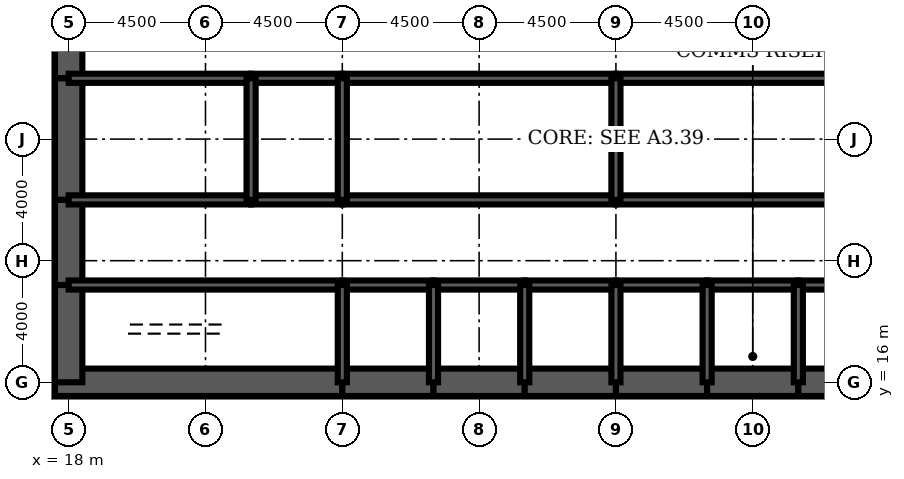
"""IFC4 building model, lengths in metres.
Left out: names, types, materials, properties, quantities, classifications, styles, units other than length and angle.
Written with IfcOpenShell. Run it as: python <this file> out.ifc"""

import sys

from ifc_helpers import new_model, si_unit, direction, frame, frame_2d, origin, place, context, subcontext, project, spatial, rectangle, extrude, element, fill, save


model = new_model("IFC4")
c1 = context("Model", 3, precision=1e-05, world=origin(), true_north=direction((0.0, 1.0)))
c2 = subcontext(c1, "Body", "Model", "MODEL_VIEW")
j1 = project(units=[si_unit("LENGTHUNIT", "METRE"), si_unit("PLANEANGLEUNIT", "RADIAN")], contexts=[c1])
p1 = place(None, origin())
s1 = spatial("IfcSite", under=j1, at=p1, CompositionType="ELEMENT")
p2 = place(p1, origin())
s2 = spatial("IfcBuilding", under=s1, at=p2, CompositionType="ELEMENT")
p3 = place(p2, frame((0.0, 0.0, 167.7)))
s3 = spatial("IfcBuildingStorey", under=s2, at=p3, CompositionType="ELEMENT", Elevation=167.7)
p4 = place(p3, frame((17.55, 16.0, 0.0), z_axis=(0.0, 0.0, 1.0), x_axis=(1.0, 0.0, 0.0)))
e1 = element("IfcWall", 1, at=p4, inside=s3, PredefinedType="SHEAR", context=c2, shape_type="SweptSolid", body=[
    extrude(rectangle(XDim=9.45, YDim=0.9, at=frame_2d((4.725, 0.0))), origin(), (0.0, 0.0, 1.0), 4.2),
])
for number, where, z_axis, x_axis in (
    (2, (27.0, 16.0, 0.0), (0.0, 0.0, 1.0), (1.0, 0.0, 0.0)),
    (3, (30.0, 16.0, 0.0), (0.0, 0.0, 1.0), (1.0, 0.0, 0.0)),
    (4, (33.0, 16.0, 0.0), (0.0, 0.0, 1.0), (1.0, 0.0, 0.0)),
    (5, (36.0, 16.0, 0.0), (0.0, 0.0, 1.0), (1.0, 0.0, 0.0)),
    (6, (39.0, 16.0, 0.0), (0.0, 0.0, 1.0), (1.0, 0.0, 0.0)),
    (7, (42.0, 16.0, 0.0), (0.0, 0.0, 1.0), (1.0, 0.0, 0.0)),
):
    element("IfcWall", number, at=place(p3, frame(where, z_axis=z_axis, x_axis=x_axis)), inside=s3, PredefinedType="SHEAR", context=c2, shape_type="SweptSolid", body=[
        extrude(rectangle(XDim=3.0, YDim=0.9, at=frame_2d((1.5, 0.0))), origin(), (0.0, 0.0, 1.0), 4.2),
    ])
p5 = place(p3, frame((18.0, 28.8, 0.0), z_axis=(0.0, 0.0, 1.0), x_axis=(0.0, -1.0, 0.0)))
e8 = element("IfcWall", 8, at=p5, inside=s3, PredefinedType="SHEAR", context=c2, shape_type="SweptSolid", body=[
    extrude(rectangle(XDim=2.8, YDim=0.9, at=frame_2d((1.4, 0.0))), origin(), (0.0, 0.0, 1.0), 4.2),
])
p6 = place(p5, frame((0.4, 0.0, 0.0)))
e9 = element("IfcOpeningElement", 9, at=p6, cuts=e8, PredefinedType="OPENING", context=c2, shape_type="SweptSolid", body=[
    extrude(rectangle(XDim=1.8, YDim=2.1, at=frame_2d((0.9, 1.05))), frame((0.0, 0.46, 0.0), z_axis=(0.0, -1.0, 0.0), x_axis=(1.0, 0.0, 0.0)), (0.0, 0.0, 1.0), 0.92),
])
p7 = place(p3, frame((18.0, 26.0, 0.0), z_axis=(0.0, 0.0, 1.0), x_axis=(0.0, -1.0, 0.0)))
e10 = element("IfcWall", 10, at=p7, inside=s3, PredefinedType="SHEAR", context=c2, shape_type="SweptSolid", body=[
    extrude(rectangle(XDim=4.0, YDim=0.9, at=frame_2d((2.0, 0.0))), origin(), (0.0, 0.0, 1.0), 4.2),
])
p8 = place(p3, frame((18.0, 22.0, 0.0), z_axis=(0.0, 0.0, 1.0), x_axis=(0.0, -1.0, 0.0)))
e11 = element("IfcWall", 11, at=p8, inside=s3, PredefinedType="SHEAR", context=c2, shape_type="SweptSolid", body=[
    extrude(rectangle(XDim=2.8, YDim=0.9, at=frame_2d((1.4, 0.0))), origin(), (0.0, 0.0, 1.0), 4.2),
])
p9 = place(p8, frame((0.6, 0.0, 0.0)))
e12 = element("IfcOpeningElement", 12, at=p9, cuts=e11, PredefinedType="OPENING", context=c2, shape_type="SweptSolid", body=[
    extrude(rectangle(XDim=1.8, YDim=2.1, at=frame_2d((0.9, 1.05))), frame((0.0, 0.46, 0.0), z_axis=(0.0, -1.0, 0.0), x_axis=(1.0, 0.0, 0.0)), (0.0, 0.0, 1.0), 0.92),
])
p10 = place(p3, frame((18.0, 19.2, 0.0), z_axis=(0.0, 0.0, 1.0), x_axis=(0.0, -1.0, 0.0)))
e13 = element("IfcWall", 13, at=p10, inside=s3, PredefinedType="SHEAR", context=c2, shape_type="SweptSolid", body=[
    extrude(rectangle(XDim=3.2, YDim=0.9, at=frame_2d((1.6, 0.0))), origin(), (0.0, 0.0, 1.0), 4.2),
])
p11 = place(p3, frame((18.0, 19.2, 0.0), z_axis=(0.0, 0.0, 1.0), x_axis=(1.0, 0.0, 0.0)))
e14 = element("IfcWall", 14, at=p11, inside=s3, PredefinedType="SOLIDWALL", context=c2, shape_type="SweptSolid", body=[
    extrude(rectangle(XDim=9.0, YDim=0.3, at=frame_2d((4.5, 0.0))), origin(), (0.0, 0.0, 1.0), 4.2),
])
p12 = place(p11, frame((0.65, 0.0, 0.0)))
e15 = element("IfcOpeningElement", 15, at=p12, cuts=e14, PredefinedType="OPENING", context=c2, shape_type="SweptSolid", body=[
    extrude(rectangle(XDim=1.0, YDim=2.1, at=frame_2d((0.5, 1.05))), frame((0.0, 0.16, 0.0), z_axis=(0.0, -1.0, 0.0), x_axis=(1.0, 0.0, 0.0)), (0.0, 0.0, 1.0), 0.32),
])
p13 = place(p3, frame((27.0, 19.2, 0.0), z_axis=(0.0, 0.0, 1.0), x_axis=(1.0, 0.0, 0.0)))
e16 = element("IfcWall", 16, at=p13, inside=s3, PredefinedType="SOLIDWALL", context=c2, shape_type="SweptSolid", body=[
    extrude(rectangle(XDim=3.0, YDim=0.3, at=frame_2d((1.5, 0.0))), origin(), (0.0, 0.0, 1.0), 4.2),
])
p14 = place(p13, frame((0.95, 0.0, 0.0)))
e17 = element("IfcOpeningElement", 17, at=p14, cuts=e16, PredefinedType="OPENING", context=c2, shape_type="SweptSolid", body=[
    extrude(rectangle(XDim=1.1, YDim=2.2, at=frame_2d((0.55, 1.1))), frame((0.0, 0.16, 0.0), z_axis=(0.0, -1.0, 0.0), x_axis=(1.0, 0.0, 0.0)), (0.0, 0.0, 1.0), 0.32),
])
p15 = place(p3, frame((30.0, 19.2, 0.0), z_axis=(0.0, 0.0, 1.0), x_axis=(1.0, 0.0, 0.0)))
e18 = element("IfcWall", 18, at=p15, inside=s3, PredefinedType="SOLIDWALL", context=c2, shape_type="SweptSolid", body=[
    extrude(rectangle(XDim=3.0, YDim=0.3, at=frame_2d((1.5, 0.0))), origin(), (0.0, 0.0, 1.0), 4.2),
])
p16 = place(p15, frame((0.95, 0.0, 0.0)))
e19 = element("IfcOpeningElement", 19, at=p16, cuts=e18, PredefinedType="OPENING", context=c2, shape_type="SweptSolid", body=[
    extrude(rectangle(XDim=1.1, YDim=2.2, at=frame_2d((0.55, 1.1))), frame((0.0, 0.16, 0.0), z_axis=(0.0, -1.0, 0.0), x_axis=(1.0, 0.0, 0.0)), (0.0, 0.0, 1.0), 0.32),
])
p17 = place(p3, frame((33.0, 19.2, 0.0), z_axis=(0.0, 0.0, 1.0), x_axis=(1.0, 0.0, 0.0)))
e20 = element("IfcWall", 20, at=p17, inside=s3, PredefinedType="SOLIDWALL", context=c2, shape_type="SweptSolid", body=[
    extrude(rectangle(XDim=3.0, YDim=0.3, at=frame_2d((1.5, 0.0))), origin(), (0.0, 0.0, 1.0), 4.2),
])
p18 = place(p17, frame((0.95, 0.0, 0.0)))
e21 = element("IfcOpeningElement", 21, at=p18, cuts=e20, PredefinedType="OPENING", context=c2, shape_type="SweptSolid", body=[
    extrude(rectangle(XDim=1.1, YDim=2.2, at=frame_2d((0.55, 1.1))), frame((0.0, 0.16, 0.0), z_axis=(0.0, -1.0, 0.0), x_axis=(1.0, 0.0, 0.0)), (0.0, 0.0, 1.0), 0.32),
])
p19 = place(p3, frame((36.0, 19.2, 0.0), z_axis=(0.0, 0.0, 1.0), x_axis=(1.0, 0.0, 0.0)))
e22 = element("IfcWall", 22, at=p19, inside=s3, PredefinedType="SOLIDWALL", context=c2, shape_type="SweptSolid", body=[
    extrude(rectangle(XDim=3.0, YDim=0.3, at=frame_2d((1.5, 0.0))), origin(), (0.0, 0.0, 1.0), 4.2),
])
p20 = place(p19, frame((0.95, 0.0, 0.0)))
e23 = element("IfcOpeningElement", 23, at=p20, cuts=e22, PredefinedType="OPENING", context=c2, shape_type="SweptSolid", body=[
    extrude(rectangle(XDim=1.1, YDim=2.2, at=frame_2d((0.55, 1.1))), frame((0.0, 0.16, 0.0), z_axis=(0.0, -1.0, 0.0), x_axis=(1.0, 0.0, 0.0)), (0.0, 0.0, 1.0), 0.32),
])
p21 = place(p3, frame((39.0, 19.2, 0.0), z_axis=(0.0, 0.0, 1.0), x_axis=(1.0, 0.0, 0.0)))
e24 = element("IfcWall", 24, at=p21, inside=s3, PredefinedType="SOLIDWALL", context=c2, shape_type="SweptSolid", body=[
    extrude(rectangle(XDim=3.0, YDim=0.3, at=frame_2d((1.5, 0.0))), origin(), (0.0, 0.0, 1.0), 4.2),
])
p22 = place(p21, frame((1.0, 0.0, 0.0)))
e25 = element("IfcOpeningElement", 25, at=p22, cuts=e24, PredefinedType="OPENING", context=c2, shape_type="SweptSolid", body=[
    extrude(rectangle(XDim=1.0, YDim=2.1, at=frame_2d((0.5, 1.05))), frame((0.0, 0.16, 0.0), z_axis=(0.0, -1.0, 0.0), x_axis=(1.0, 0.0, 0.0)), (0.0, 0.0, 1.0), 0.32),
])
p23 = place(p3, frame((42.0, 19.2, 0.0), z_axis=(0.0, 0.0, 1.0), x_axis=(1.0, 0.0, 0.0)))
e26 = element("IfcWall", 26, at=p23, inside=s3, PredefinedType="SOLIDWALL", context=c2, shape_type="SweptSolid", body=[
    extrude(rectangle(XDim=3.0, YDim=0.3, at=frame_2d((1.5, 0.0))), origin(), (0.0, 0.0, 1.0), 4.2),
])
p24 = place(p3, frame((18.0, 22.0, 0.0), z_axis=(0.0, 0.0, 1.0), x_axis=(1.0, 0.0, 0.0)))
e27 = element("IfcWall", 27, at=p24, inside=s3, PredefinedType="SOLIDWALL", context=c2, shape_type="SweptSolid", body=[
    extrude(rectangle(XDim=6.0, YDim=0.3, at=frame_2d((3.0, 0.0))), origin(), (0.0, 0.0, 1.0), 4.2),
])
p25 = place(p24, frame((4.4, 0.0, 0.0)))
e28 = element("IfcOpeningElement", 28, at=p25, cuts=e27, PredefinedType="OPENING", context=c2, shape_type="SweptSolid", body=[
    extrude(rectangle(XDim=1.0, YDim=2.1, at=frame_2d((0.5, 1.05))), frame((0.0, 0.16, 0.0), z_axis=(0.0, -1.0, 0.0), x_axis=(1.0, 0.0, 0.0)), (0.0, 0.0, 1.0), 0.32),
])
p26 = place(p24, frame((1.0, 0.0, 0.0)))
e29 = element("IfcOpeningElement", 29, at=p26, cuts=e27, PredefinedType="OPENING", context=c2, shape_type="SweptSolid", body=[
    extrude(rectangle(XDim=1.0, YDim=2.1, at=frame_2d((0.5, 1.05))), frame((0.0, 0.16, 0.0), z_axis=(0.0, -1.0, 0.0), x_axis=(1.0, 0.0, 0.0)), (0.0, 0.0, 1.0), 0.32),
])
p27 = place(p3, frame((24.0, 22.0, 0.0), z_axis=(0.0, 0.0, 1.0), x_axis=(1.0, 0.0, 0.0)))
e30 = element("IfcWall", 30, at=p27, inside=s3, PredefinedType="SOLIDWALL", context=c2, shape_type="SweptSolid", body=[
    extrude(rectangle(XDim=3.0, YDim=0.3, at=frame_2d((1.5, 0.0))), origin(), (0.0, 0.0, 1.0), 4.2),
])
p28 = place(p27, frame((1.0, 0.0, 0.0)))
e31 = element("IfcOpeningElement", 31, at=p28, cuts=e30, PredefinedType="OPENING", context=c2, shape_type="SweptSolid", body=[
    extrude(rectangle(XDim=1.0, YDim=2.1, at=frame_2d((0.5, 1.05))), frame((0.0, 0.16, 0.0), z_axis=(0.0, -1.0, 0.0), x_axis=(1.0, 0.0, 0.0)), (0.0, 0.0, 1.0), 0.32),
])
p29 = place(p3, frame((27.0, 22.0, 0.0), z_axis=(0.0, 0.0, 1.0), x_axis=(1.0, 0.0, 0.0)))
e32 = element("IfcWall", 32, at=p29, inside=s3, PredefinedType="SOLIDWALL", context=c2, shape_type="SweptSolid", body=[
    extrude(rectangle(XDim=9.0, YDim=0.3, at=frame_2d((4.5, 0.0))), origin(), (0.0, 0.0, 1.0), 4.2),
])
p30 = place(p29, frame((4.0, 0.0, 0.0)))
e33 = element("IfcOpeningElement", 33, at=p30, cuts=e32, PredefinedType="OPENING", context=c2, shape_type="SweptSolid", body=[
    extrude(rectangle(XDim=1.0, YDim=2.1, at=frame_2d((0.5, 1.05))), frame((0.0, 0.16, 0.0), z_axis=(0.0, -1.0, 0.0), x_axis=(1.0, 0.0, 0.0)), (0.0, 0.0, 1.0), 0.32),
])
p31 = place(p3, frame((36.0, 22.0, 0.0), z_axis=(0.0, 0.0, 1.0), x_axis=(1.0, 0.0, 0.0)))
e34 = element("IfcWall", 34, at=p31, inside=s3, PredefinedType="SOLIDWALL", context=c2, shape_type="SweptSolid", body=[
    extrude(rectangle(XDim=9.0, YDim=0.3, at=frame_2d((4.5, 0.0))), origin(), (0.0, 0.0, 1.0), 4.2),
])
p32 = place(p31, frame((4.0, 0.0, 0.0)))
e35 = element("IfcOpeningElement", 35, at=p32, cuts=e34, PredefinedType="OPENING", context=c2, shape_type="SweptSolid", body=[
    extrude(rectangle(XDim=1.0, YDim=2.1, at=frame_2d((0.5, 1.05))), frame((0.0, 0.16, 0.0), z_axis=(0.0, -1.0, 0.0), x_axis=(1.0, 0.0, 0.0)), (0.0, 0.0, 1.0), 0.32),
])
p33 = place(p3, frame((18.0, 26.0, 0.0), z_axis=(0.0, 0.0, 1.0), x_axis=(1.0, 0.0, 0.0)))
e36 = element("IfcWall", 36, at=p33, inside=s3, PredefinedType="SOLIDWALL", context=c2, shape_type="SweptSolid", body=[
    extrude(rectangle(XDim=6.0, YDim=0.3, at=frame_2d((3.0, 0.0))), origin(), (0.0, 0.0, 1.0), 4.2),
])
p34 = place(p3, frame((24.0, 26.0, 0.0), z_axis=(0.0, 0.0, 1.0), x_axis=(1.0, 0.0, 0.0)))
e37 = element("IfcWall", 37, at=p34, inside=s3, PredefinedType="SOLIDWALL", context=c2, shape_type="SweptSolid", body=[
    extrude(rectangle(XDim=3.0, YDim=0.3, at=frame_2d((1.5, 0.0))), origin(), (0.0, 0.0, 1.0), 4.2),
])
for number, where, z_axis, x_axis in (
    (38, (27.0, 26.0, 0.0), (0.0, 0.0, 1.0), (1.0, 0.0, 0.0)),
    (39, (36.0, 26.0, 0.0), (0.0, 0.0, 1.0), (1.0, 0.0, 0.0)),
):
    element("IfcWall", number, at=place(p3, frame(where, z_axis=z_axis, x_axis=x_axis)), inside=s3, PredefinedType="SOLIDWALL", context=c2, shape_type="SweptSolid", body=[
        extrude(rectangle(XDim=9.0, YDim=0.3, at=frame_2d((4.5, 0.0))), origin(), (0.0, 0.0, 1.0), 4.2),
    ])
for number, where, z_axis, x_axis in (
    (40, (27.0, 16.0, 0.0), (0.0, 0.0, 1.0), (0.0, 1.0, 0.0)),
    (41, (30.0, 16.0, 0.0), (0.0, 0.0, 1.0), (0.0, 1.0, 0.0)),
    (42, (33.0, 16.0, 0.0), (0.0, 0.0, 1.0), (0.0, 1.0, 0.0)),
    (43, (36.0, 16.0, 0.0), (0.0, 0.0, 1.0), (0.0, 1.0, 0.0)),
    (44, (39.0, 16.0, 0.0), (0.0, 0.0, 1.0), (0.0, 1.0, 0.0)),
    (45, (42.0, 16.0, 0.0), (0.0, 0.0, 1.0), (0.0, 1.0, 0.0)),
):
    element("IfcWall", number, at=place(p3, frame(where, z_axis=z_axis, x_axis=x_axis)), inside=s3, PredefinedType="SOLIDWALL", context=c2, shape_type="SweptSolid", body=[
        extrude(rectangle(XDim=3.2, YDim=0.3, at=frame_2d((1.6, 0.0))), origin(), (0.0, 0.0, 1.0), 4.2),
    ])
for number, where, z_axis, x_axis in (
    (46, (24.0, 22.0, 0.0), (0.0, 0.0, 1.0), (0.0, 1.0, 0.0)),
    (47, (27.0, 22.0, 0.0), (0.0, 0.0, 1.0), (0.0, 1.0, 0.0)),
    (48, (36.0, 22.0, 0.0), (0.0, 0.0, 1.0), (0.0, 1.0, 0.0)),
):
    element("IfcWall", number, at=place(p3, frame(where, z_axis=z_axis, x_axis=x_axis)), inside=s3, PredefinedType="SOLIDWALL", context=c2, shape_type="SweptSolid", body=[
        extrude(rectangle(XDim=4.0, YDim=0.3, at=frame_2d((2.0, 0.0))), origin(), (0.0, 0.0, 1.0), 4.2),
    ])
p35 = place(p3, frame((39.15, 17.4, 0.0), z_axis=(0.0, 0.0, 1.0), x_axis=(1.0, 0.0, 0.0)))
e49 = element("IfcWall", 49, at=p35, inside=s3, PredefinedType="SOLIDWALL", context=c2, shape_type="SweptSolid", body=[
    extrude(rectangle(XDim=2.7, YDim=0.3, at=frame_2d((1.35, 0.0))), origin(), (0.0, 0.0, 1.0), 4.04),
])
p36 = place(p35, frame((0.85, 0.0, 0.0)))
e50 = element("IfcOpeningElement", 50, at=p36, cuts=e49, PredefinedType="OPENING", context=c2, shape_type="SweptSolid", body=[
    extrude(rectangle(XDim=1.0, YDim=2.1, at=frame_2d((0.5, 1.05))), frame((0.0, 0.16, 0.0), z_axis=(0.0, -1.0, 0.0), x_axis=(1.0, 0.0, 0.0)), (0.0, 0.0, 1.0), 0.32),
])
p37 = place(p3, frame((38.5, 22.15, 0.0), z_axis=(0.0, 0.0, 1.0), x_axis=(0.0, 1.0, 0.0)))
e51 = element("IfcWall", 51, at=p37, inside=s3, PredefinedType="PARTITIONING", context=c2, shape_type="SweptSolid", body=[
    extrude(rectangle(XDim=3.7, YDim=0.15, at=frame_2d((1.85, 0.0))), origin(), (0.0, 0.0, 1.0), 3.0),
])
p38 = place(p37, frame((2.2, 0.0, 0.0)))
e52 = element("IfcOpeningElement", 52, at=p38, cuts=e51, PredefinedType="OPENING", context=c2, shape_type="SweptSolid", body=[
    extrude(rectangle(XDim=1.0, YDim=2.1, at=frame_2d((0.5, 1.05))), frame((0.0, 0.085, 0.0), z_axis=(0.0, -1.0, 0.0), x_axis=(1.0, 0.0, 0.0)), (0.0, 0.0, 1.0), 0.17),
])
p39 = place(p3, frame((20.625, 22.15, 0.0), z_axis=(0.0, 0.0, 1.0), x_axis=(0.0, 1.0, 0.0)))
e53 = element("IfcWall", 53, at=p39, inside=s3, PredefinedType="PARTITIONING", context=c2, shape_type="SweptSolid", body=[
    extrude(rectangle(XDim=3.7, YDim=0.15, at=frame_2d((1.85, 0.0))), origin(), (0.0, 0.0, 1.0), 3.0),
])
p40 = place(p3, frame((24.5, 19.35, 0.0), z_axis=(0.0, 0.0, 1.0), x_axis=(0.0, 1.0, 0.0)))
e54 = element("IfcWall", 54, at=p40, inside=s3, PredefinedType="PARTITIONING", context=c2, shape_type="SweptSolid", body=[
    extrude(rectangle(XDim=2.5, YDim=0.15, at=frame_2d((1.25, 0.0))), origin(), (0.0, 0.0, 1.0), 3.0),
])
p41 = place(p40, frame((1.15, 0.0, 0.0)))
e55 = element("IfcOpeningElement", 55, at=p41, cuts=e54, PredefinedType="OPENING", context=c2, shape_type="SweptSolid", body=[
    extrude(rectangle(XDim=1.0, YDim=2.1, at=frame_2d((0.5, 1.05))), frame((0.0, 0.085, 0.0), z_axis=(0.0, -1.0, 0.0), x_axis=(1.0, 0.0, 0.0)), (0.0, 0.0, 1.0), 0.17),
])
p42 = place(p36, origin())
e56 = element("IfcDoor", 56, at=p42, inside=s3, OperationType="SINGLE_SWING_LEFT", PredefinedType="DOOR", context=c2, shape_type="SweptSolid", body=[
    extrude(rectangle(XDim=1.0, YDim=2.1, at=frame_2d((0.5, 1.05))), frame((0.0, 0.025, 0.0), z_axis=(0.0, -1.0, 0.0), x_axis=(1.0, 0.0, 0.0)), (0.0, 0.0, 1.0), 0.05),
])
fill(e50, e56)
p43 = place(p38, origin())
e57 = element("IfcDoor", 57, at=p43, inside=s3, OperationType="SINGLE_SWING_RIGHT", PredefinedType="DOOR", context=c2, shape_type="SweptSolid", body=[
    extrude(rectangle(XDim=1.0, YDim=2.1, at=frame_2d((0.5, 1.05))), frame((0.0, 0.025, 0.0), z_axis=(0.0, -1.0, 0.0), x_axis=(1.0, 0.0, 0.0)), (0.0, 0.0, 1.0), 0.05),
])
fill(e52, e57)
p44 = place(p41, origin())
e58 = element("IfcDoor", 58, at=p44, inside=s3, OperationType="SINGLE_SWING_RIGHT", PredefinedType="DOOR", context=c2, shape_type="SweptSolid", body=[
    extrude(rectangle(XDim=1.0, YDim=2.1, at=frame_2d((0.5, 1.05))), frame((0.0, 0.025, 0.0), z_axis=(0.0, -1.0, 0.0), x_axis=(1.0, 0.0, 0.0)), (0.0, 0.0, 1.0), 0.05),
])
fill(e55, e58)
p45 = place(p14, origin())
e59 = element("IfcDoor", 59, at=p45, inside=s3, OperationType="DOUBLE_DOOR_SLIDING", PredefinedType="USERDEFINED", context=c2, shape_type="SweptSolid", body=[
    extrude(rectangle(XDim=1.1, YDim=2.2, at=frame_2d((0.55, 1.1))), frame((0.0, 0.025, 0.0), z_axis=(0.0, -1.0, 0.0), x_axis=(1.0, 0.0, 0.0)), (0.0, 0.0, 1.0), 0.05),
])
fill(e17, e59)
p46 = place(p16, origin())
e60 = element("IfcDoor", 60, at=p46, inside=s3, OperationType="DOUBLE_DOOR_SLIDING", PredefinedType="USERDEFINED", context=c2, shape_type="SweptSolid", body=[
    extrude(rectangle(XDim=1.1, YDim=2.2, at=frame_2d((0.55, 1.1))), frame((0.0, 0.025, 0.0), z_axis=(0.0, -1.0, 0.0), x_axis=(1.0, 0.0, 0.0)), (0.0, 0.0, 1.0), 0.05),
])
fill(e19, e60)
p47 = place(p18, origin())
e61 = element("IfcDoor", 61, at=p47, inside=s3, OperationType="DOUBLE_DOOR_SLIDING", PredefinedType="USERDEFINED", context=c2, shape_type="SweptSolid", body=[
    extrude(rectangle(XDim=1.1, YDim=2.2, at=frame_2d((0.55, 1.1))), frame((0.0, 0.025, 0.0), z_axis=(0.0, -1.0, 0.0), x_axis=(1.0, 0.0, 0.0)), (0.0, 0.0, 1.0), 0.05),
])
fill(e21, e61)
p48 = place(p20, origin())
e62 = element("IfcDoor", 62, at=p48, inside=s3, OperationType="DOUBLE_DOOR_SLIDING", PredefinedType="USERDEFINED", context=c2, shape_type="SweptSolid", body=[
    extrude(rectangle(XDim=1.1, YDim=2.2, at=frame_2d((0.55, 1.1))), frame((0.0, 0.025, 0.0), z_axis=(0.0, -1.0, 0.0), x_axis=(1.0, 0.0, 0.0)), (0.0, 0.0, 1.0), 0.05),
])
fill(e23, e62)
p49 = place(p12, origin())
e63 = element("IfcDoor", 63, at=p49, inside=s3, OperationType="SINGLE_SWING_LEFT", PredefinedType="DOOR", context=c2, shape_type="SweptSolid", body=[
    extrude(rectangle(XDim=1.0, YDim=2.1, at=frame_2d((0.5, 1.05))), frame((0.0, 0.025, 0.0), z_axis=(0.0, -1.0, 0.0), x_axis=(1.0, 0.0, 0.0)), (0.0, 0.0, 1.0), 0.05),
])
fill(e15, e63)
p50 = place(p9, origin())
e64 = element("IfcDoor", 64, at=p50, inside=s3, OperationType="SINGLE_SWING_LEFT", PredefinedType="DOOR", context=c2, shape_type="SweptSolid", body=[
    extrude(rectangle(XDim=1.8, YDim=2.1, at=frame_2d((0.9, 1.05))), frame((0.0, 0.45, 0.0), z_axis=(0.0, -1.0, 0.0), x_axis=(1.0, 0.0, 0.0)), (0.0, 0.0, 1.0), 0.899),
])
fill(e12, e64)
p51 = place(p6, origin())
e65 = element("IfcDoor", 65, at=p51, inside=s3, OperationType="SINGLE_SWING_LEFT", PredefinedType="DOOR", context=c2, shape_type="SweptSolid", body=[
    extrude(rectangle(XDim=1.8, YDim=2.1, at=frame_2d((0.9, 1.05))), frame((0.0, 0.45, 0.0), z_axis=(0.0, -1.0, 0.0), x_axis=(1.0, 0.0, 0.0)), (0.0, 0.0, 1.0), 0.899),
])
fill(e9, e65)
p52 = place(p25, origin())
e66 = element("IfcDoor", 66, at=p52, inside=s3, OperationType="SINGLE_SWING_RIGHT", PredefinedType="DOOR", context=c2, shape_type="SweptSolid", body=[
    extrude(rectangle(XDim=1.0, YDim=2.1, at=frame_2d((0.5, 1.05))), frame((0.0, 0.025, 0.0), z_axis=(0.0, -1.0, 0.0), x_axis=(1.0, 0.0, 0.0)), (0.0, 0.0, 1.0), 0.05),
])
fill(e28, e66)
p53 = place(p28, origin())
e67 = element("IfcDoor", 67, at=p53, inside=s3, OperationType="SINGLE_SWING_LEFT", PredefinedType="DOOR", context=c2, shape_type="SweptSolid", body=[
    extrude(rectangle(XDim=1.0, YDim=2.1, at=frame_2d((0.5, 1.05))), frame((0.0, 0.025, 0.0), z_axis=(0.0, -1.0, 0.0), x_axis=(1.0, 0.0, 0.0)), (0.0, 0.0, 1.0), 0.05),
])
fill(e31, e67)
p54 = place(p30, origin())
e68 = element("IfcDoor", 68, at=p54, inside=s3, OperationType="SINGLE_SWING_LEFT", PredefinedType="DOOR", context=c2, shape_type="SweptSolid", body=[
    extrude(rectangle(XDim=1.0, YDim=2.1, at=frame_2d((0.5, 1.05))), frame((0.0, 0.025, 0.0), z_axis=(0.0, -1.0, 0.0), x_axis=(1.0, 0.0, 0.0)), (0.0, 0.0, 1.0), 0.05),
])
fill(e33, e68)
p55 = place(p32, origin())
e69 = element("IfcDoor", 69, at=p55, inside=s3, OperationType="SINGLE_SWING_LEFT", PredefinedType="DOOR", context=c2, shape_type="SweptSolid", body=[
    extrude(rectangle(XDim=1.0, YDim=2.1, at=frame_2d((0.5, 1.05))), frame((0.0, 0.025, 0.0), z_axis=(0.0, -1.0, 0.0), x_axis=(1.0, 0.0, 0.0)), (0.0, 0.0, 1.0), 0.05),
])
fill(e35, e69)
p56 = place(p26, origin())
e70 = element("IfcDoor", 70, at=p56, inside=s3, OperationType="SINGLE_SWING_LEFT", PredefinedType="DOOR", context=c2, shape_type="SweptSolid", body=[
    extrude(rectangle(XDim=1.0, YDim=2.1, at=frame_2d((0.5, 1.05))), frame((0.0, 0.025, 0.0), z_axis=(0.0, -1.0, 0.0), x_axis=(1.0, 0.0, 0.0)), (0.0, 0.0, 1.0), 0.05),
])
fill(e29, e70)
p57 = place(p22, origin())
e71 = element("IfcDoor", 71, at=p57, inside=s3, OperationType="SINGLE_SWING_LEFT", PredefinedType="DOOR", context=c2, shape_type="SweptSolid", body=[
    extrude(rectangle(XDim=1.0, YDim=2.1, at=frame_2d((0.5, 1.05))), frame((0.0, 0.025, 0.0), z_axis=(0.0, -1.0, 0.0), x_axis=(1.0, 0.0, 0.0)), (0.0, 0.0, 1.0), 0.05),
])
fill(e25, e71)
save(model, sys.argv[1])
